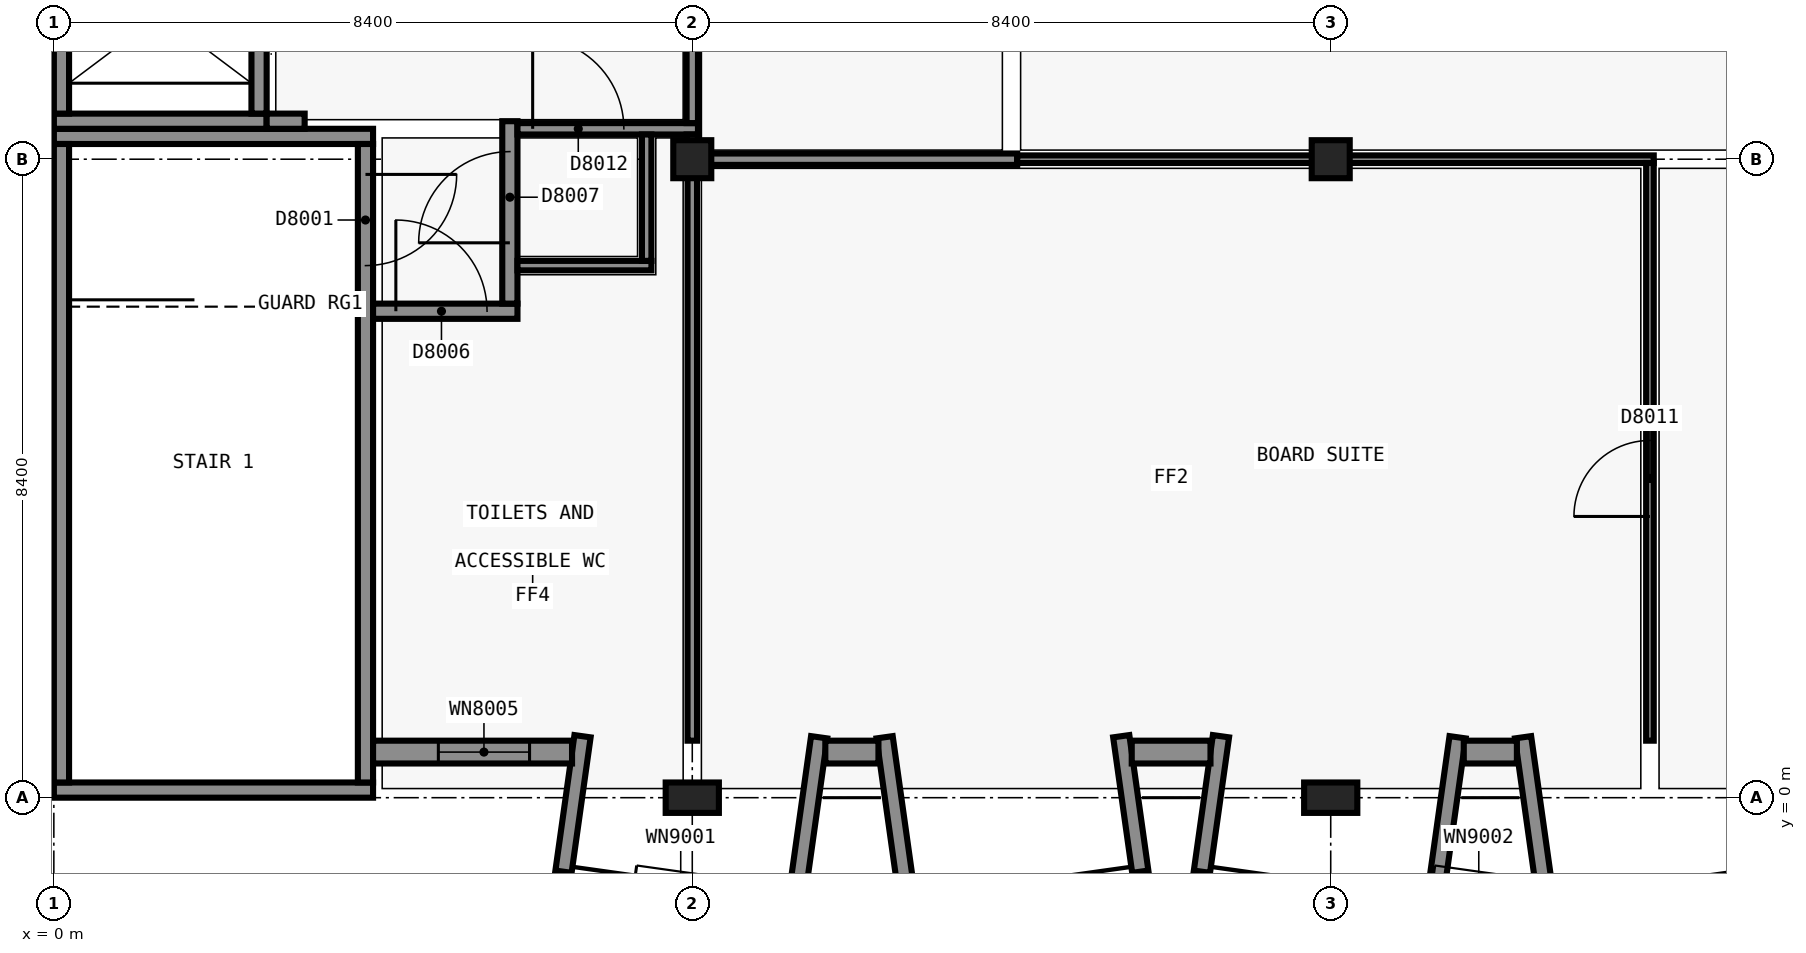
"""IFC4 building model, lengths in metres.
Left out: names, types, materials, properties, quantities, classifications, styles, units other than length and angle.
Written with IfcOpenShell. Run it as: python <this file> out.ifc"""

import sys

from ifc_helpers import new_model, si_unit, direction, frame, frame_2d, origin, origin_2d, place, context, subcontext, project, spatial, rectangle, extrude, element, fill, save


model = new_model("IFC4")
c1 = context("Model", 3, precision=1e-05, world=origin(), true_north=direction((0.0, 1.0)))
c2 = subcontext(c1, "Body", "Model", "MODEL_VIEW")
j1 = project(units=[si_unit("LENGTHUNIT", "METRE"), si_unit("PLANEANGLEUNIT", "RADIAN")], contexts=[c1])
p1 = place(None, origin())
s1 = spatial("IfcSite", under=j1, at=p1, CompositionType="ELEMENT")
p2 = place(p1, origin())
s2 = spatial("IfcBuilding", under=s1, at=p2, CompositionType="ELEMENT")
p3 = place(p2, frame((0.0, 0.0, 38.1)))
s3 = spatial("IfcBuildingStorey", under=s2, at=p3, CompositionType="ELEMENT", Elevation=38.1)
for number, where, z_axis, x_axis in (
    (1, (4.2, 0.1, 0.0), (0.0, 0.0, 1.0), (-1.0, 0.0, 0.0)),
    (2, (0.0, 8.7, 0.0), (0.0, 0.0, 1.0), (1.0, 0.0, 0.0)),
):
    element("IfcWall", number, at=place(p3, frame(where, z_axis=z_axis, x_axis=x_axis)), inside=s3, PredefinedType="SHEAR", context=c2, shape_type="SweptSolid", body=[
        extrude(rectangle(XDim=4.199, YDim=0.2, at=frame_2d((2.1, 0.0))), origin(), (0.0, 0.0, 1.0), 4.5),
    ])
p4 = place(p3, frame((0.1, 0.2, 0.0), z_axis=(0.0, 0.0, 1.0), x_axis=(0.0, 1.0, 0.0)))
e3 = element("IfcWall", 3, at=p4, inside=s3, PredefinedType="SHEAR", context=c2, shape_type="SweptSolid", body=[
    extrude(rectangle(XDim=8.4, YDim=0.2, at=frame_2d((4.2, 0.0))), origin(), (0.0, 0.0, 1.0), 4.5),
])
p5 = place(p3, frame((4.1, 8.6, 0.0), z_axis=(0.0, 0.0, 1.0), x_axis=(0.0, -1.0, 0.0)))
e4 = element("IfcWall", 4, at=p5, inside=s3, PredefinedType="SHEAR", context=c2, shape_type="SweptSolid", body=[
    extrude(rectangle(XDim=8.4, YDim=0.2, at=frame_2d((4.2, 0.0))), origin(), (0.0, 0.0, 1.0), 4.5),
])
p6 = place(p5, frame((0.4, 0.0, 0.0)))
e5 = element("IfcOpeningElement", 5, at=p6, cuts=e4, PredefinedType="OPENING", context=c2, shape_type="SweptSolid", body=[
    extrude(rectangle(XDim=1.2, YDim=2.1, at=frame_2d((0.6, 1.05))), frame((0.0, 0.11, 0.0), z_axis=(0.0, -1.0, 0.0), x_axis=(1.0, 0.0, 0.0)), (0.0, 0.0, 1.0), 0.22),
])
p7 = place(p3, frame((2.8, 8.9, 0.0), z_axis=(0.0, 0.0, 1.0), x_axis=(-1.0, 0.0, 0.0)))
e6 = element("IfcWall", 6, at=p7, inside=s3, PredefinedType="SHEAR", context=c2, shape_type="SweptSolid", body=[
    extrude(rectangle(XDim=2.8, YDim=0.2, at=frame_2d((1.4, 0.0))), origin(), (0.0, 0.0, 1.0), 4.5),
])
p8 = place(p3, frame((0.1, 9.0, 0.0), z_axis=(0.0, 0.0, 1.0), x_axis=(0.0, 1.0, 0.0)))
e7 = element("IfcWall", 7, at=p8, inside=s3, PredefinedType="SHEAR", context=c2, shape_type="SweptSolid", body=[
    extrude(rectangle(XDim=2.7, YDim=0.2, at=frame_2d((1.35, 0.0))), origin(), (0.0, 0.0, 1.0), 4.5),
])
p9 = place(p3, frame((2.7, 11.7, 0.0), z_axis=(0.0, 0.0, 1.0), x_axis=(0.0, -1.0, 0.0)))
e8 = element("IfcWall", 8, at=p9, inside=s3, PredefinedType="SHEAR", context=c2, shape_type="SweptSolid", body=[
    extrude(rectangle(XDim=2.7, YDim=0.2, at=frame_2d((1.35, 0.0))), origin(), (0.0, 0.0, 1.0), 4.5),
])
p10 = place(p9, frame((0.85, 0.0, 0.0)))
e9 = element("IfcOpeningElement", 9, at=p10, cuts=e8, PredefinedType="OPENING", context=c2, shape_type="SweptSolid", body=[
    extrude(rectangle(XDim=1.1, YDim=2.1, at=frame_2d((0.55, 1.05))), frame((0.0, 0.11, 0.0), z_axis=(0.0, -1.0, 0.0), x_axis=(1.0, 0.0, 0.0)), (0.0, 0.0, 1.0), 0.22),
])
p11 = place(p3, frame((8.4, 0.0, 0.0), z_axis=(0.0, 0.0, 1.0), x_axis=(1.0, 0.0, 0.0)))
e10 = element("IfcColumn", 10, at=p11, inside=s3, PredefinedType="COLUMN", context=c2, shape_type="SweptSolid", body=[
    extrude(rectangle(XDim=0.7, YDim=0.4, at=origin_2d()), origin(), (0.0, 0.0, 1.0), 4.5),
])
p12 = place(p3, frame((8.4, 8.4, 0.0), z_axis=(0.0, 0.0, 1.0), x_axis=(1.0, 0.0, 0.0)))
e11 = element("IfcColumn", 11, at=p12, inside=s3, PredefinedType="COLUMN", context=c2, shape_type="SweptSolid", body=[
    extrude(rectangle(XDim=0.5, YDim=0.5, at=origin_2d()), origin(), (0.0, 0.0, 1.0), 4.5),
])
p13 = place(p3, frame((16.8, 0.0, 0.0), z_axis=(0.0, 0.0, 1.0), x_axis=(1.0, 0.0, 0.0)))
e12 = element("IfcColumn", 12, at=p13, inside=s3, PredefinedType="COLUMN", context=c2, shape_type="SweptSolid", body=[
    extrude(rectangle(XDim=0.7, YDim=0.4, at=origin_2d()), origin(), (0.0, 0.0, 1.0), 4.5),
])
p14 = place(p3, frame((16.8, 8.4, 0.0), z_axis=(0.0, 0.0, 1.0), x_axis=(1.0, 0.0, 0.0)))
e13 = element("IfcColumn", 13, at=p14, inside=s3, PredefinedType="COLUMN", context=c2, shape_type="SweptSolid", body=[
    extrude(rectangle(XDim=0.5, YDim=0.5, at=origin_2d()), origin(), (0.0, 0.0, 1.0), 4.5),
])
p15 = place(p3, frame((3.3, 8.9, 0.0), z_axis=(0.0, 0.0, 1.0), x_axis=(-1.0, 0.0, 0.0)))
e14 = element("IfcWall", 14, at=p15, inside=s3, PredefinedType="SHEAR", context=c2, shape_type="SweptSolid", body=[
    extrude(rectangle(XDim=0.5, YDim=0.2, at=frame_2d((0.25, 0.0))), origin(), (0.0, 0.0, 1.0), 4.5),
])
p16 = place(p3, frame((6.956, 0.809, 0.0), z_axis=(0.0, 0.0, 1.0), x_axis=(-0.139161311926, -0.990269725511, 0.0)))
e15 = element("IfcWall", 15, at=p16, inside=s3, PredefinedType="SOLIDWALL", context=c2, shape_type="SweptSolid", body=[
    extrude(rectangle(XDim=1.8, YDim=0.215, at=frame_2d((0.9, 0.0))), origin(), (0.0, 0.0, 1.0), 4.2),
])
for number, where, z_axis, x_axis in (
    (16, (10.069, 0.795, 0.0), (0.0, 0.0, 1.0), (-0.139, -0.99, 0.0)),
    (17, (10.931, 0.795, 0.0), (0.0, 0.0, 1.0), (0.139, -0.99, 0.0)),
):
    element("IfcWall", number, at=place(p3, frame(where, z_axis=z_axis, x_axis=x_axis)), inside=s3, PredefinedType="SOLIDWALL", context=c2, shape_type="SweptSolid", body=[
        extrude(rectangle(XDim=2.219, YDim=0.215, at=frame_2d((1.11, 0.0))), origin(), (0.0, 0.0, 1.0), 4.2),
    ])
for number, where, z_axis, x_axis in (
    (18, (14.044, 0.809, 0.0), (0.0, 0.0, 1.0), (0.139, -0.99, 0.0)),
    (19, (15.356, 0.809, 0.0), (0.0, 0.0, 1.0), (-0.139, -0.99, 0.0)),
):
    element("IfcWall", number, at=place(p3, frame(where, z_axis=z_axis, x_axis=x_axis)), inside=s3, PredefinedType="SOLIDWALL", context=c2, shape_type="SweptSolid", body=[
        extrude(rectangle(XDim=1.8, YDim=0.215, at=frame_2d((0.9, 0.0))), origin(), (0.0, 0.0, 1.0), 4.2),
    ])
p17 = place(p3, frame((18.469, 0.795, 0.0), z_axis=(0.0, 0.0, 1.0), x_axis=(-0.139249775508, -0.99025728981, 0.0)))
e20 = element("IfcWall", 20, at=p17, inside=s3, PredefinedType="SOLIDWALL", context=c2, shape_type="SweptSolid", body=[
    extrude(rectangle(XDim=2.22, YDim=0.215, at=frame_2d((1.11, 0.0))), origin(), (0.0, 0.0, 1.0), 4.2),
])
p18 = place(p3, frame((19.331, 0.795, 0.0), z_axis=(0.0, 0.0, 1.0), x_axis=(0.139141913905, -0.990272451295, 0.0)))
e21 = element("IfcWall", 21, at=p18, inside=s3, PredefinedType="SOLIDWALL", context=c2, shape_type="SweptSolid", body=[
    extrude(rectangle(XDim=2.219, YDim=0.215, at=frame_2d((1.11, 0.0))), origin(), (0.0, 0.0, 1.0), 4.2),
])
p19 = place(p3, frame((6.818, 0.6, 0.0), z_axis=(0.0, 0.0, 1.0), x_axis=(-1.0, 0.0, 0.0)))
e22 = element("IfcWall", 22, at=p19, inside=s3, PredefinedType="SOLIDWALL", context=c2, shape_type="SweptSolid", body=[
    extrude(rectangle(XDim=2.618, YDim=0.3, at=frame_2d((1.309, 0.0))), origin(), (0.0, 0.0, 1.0), 4.2),
])
p20 = place(p19, frame((0.559, 0.0, 0.9)))
e23 = element("IfcOpeningElement", 23, at=p20, cuts=e22, PredefinedType="OPENING", context=c2, shape_type="SweptSolid", body=[
    extrude(rectangle(XDim=1.2, YDim=1.5, at=frame_2d((0.6, 0.75))), frame((0.0, 0.16, 0.0), z_axis=(0.0, -1.0, 0.0), x_axis=(1.0, 0.0, 0.0)), (0.0, 0.0, 1.0), 0.32),
])
p21 = place(p3, frame((10.85, 0.6, 0.0), z_axis=(0.0, 0.0, 1.0), x_axis=(-1.0, 0.0, 0.0)))
e24 = element("IfcWall", 24, at=p21, inside=s3, PredefinedType="SOLIDWALL", context=c2, shape_type="SweptSolid", body=[
    extrude(rectangle(XDim=0.699, YDim=0.3, at=frame_2d((0.35, 0.0))), origin(), (0.0, 0.0, 1.0), 4.2),
])
p22 = place(p3, frame((15.218, 0.6, 0.0), z_axis=(0.0, 0.0, 1.0), x_axis=(-1.0, 0.0, 0.0)))
e25 = element("IfcWall", 25, at=p22, inside=s3, PredefinedType="SOLIDWALL", context=c2, shape_type="SweptSolid", body=[
    extrude(rectangle(XDim=1.036, YDim=0.3, at=frame_2d((0.518, 0.0))), origin(), (0.0, 0.0, 1.0), 4.2),
])
p23 = place(p3, frame((19.25, 0.6, 0.0), z_axis=(0.0, 0.0, 1.0), x_axis=(-1.0, 0.0, 0.0)))
e26 = element("IfcWall", 26, at=p23, inside=s3, PredefinedType="SOLIDWALL", context=c2, shape_type="SweptSolid", body=[
    extrude(rectangle(XDim=0.699, YDim=0.3, at=frame_2d((0.35, 0.0))), origin(), (0.0, 0.0, 1.0), 4.2),
])
p24 = place(p3, frame((4.2, 6.4, 0.0), z_axis=(0.0, 0.0, 1.0), x_axis=(1.0, 0.0, 0.0)))
e27 = element("IfcWall", 27, at=p24, inside=s3, PredefinedType="SOLIDWALL", context=c2, shape_type="SweptSolid", body=[
    extrude(rectangle(XDim=1.9, YDim=0.2, at=frame_2d((0.95, 0.0))), origin(), (0.0, 0.0, 1.0), 4.2),
])
p25 = place(p24, frame((0.3, 0.0, 0.0)))
e28 = element("IfcOpeningElement", 28, at=p25, cuts=e27, PredefinedType="OPENING", context=c2, shape_type="SweptSolid", body=[
    extrude(rectangle(XDim=1.2, YDim=2.1, at=frame_2d((0.6, 1.05))), frame((0.0, 0.11, 0.0), z_axis=(0.0, -1.0, 0.0), x_axis=(1.0, 0.0, 0.0)), (0.0, 0.0, 1.0), 0.22),
])
p26 = place(p3, frame((6.0, 6.5, 0.0), z_axis=(0.0, 0.0, 1.0), x_axis=(0.0, 1.0, 0.0)))
e29 = element("IfcWall", 29, at=p26, inside=s3, PredefinedType="SOLIDWALL", context=c2, shape_type="SweptSolid", body=[
    extrude(rectangle(XDim=2.4, YDim=0.2, at=frame_2d((1.2, 0.0))), origin(), (0.0, 0.0, 1.0), 3.6),
])
p27 = place(p26, frame((0.8, 0.0, 0.0)))
e30 = element("IfcOpeningElement", 30, at=p27, cuts=e29, PredefinedType="OPENING", context=c2, shape_type="SweptSolid", body=[
    extrude(rectangle(XDim=1.2, YDim=2.1, at=frame_2d((0.6, 1.05))), frame((0.0, 0.11, 0.0), z_axis=(0.0, -1.0, 0.0), x_axis=(1.0, 0.0, 0.0)), (0.0, 0.0, 1.0), 0.22),
])
p28 = place(p3, frame((8.325, 8.4, 0.0), z_axis=(0.0, 0.0, 1.0), x_axis=(1.0, 0.0, 0.0)))
e31 = element("IfcWall", 31, at=p28, inside=s3, PredefinedType="PARTITIONING", context=c2, shape_type="SweptSolid", body=[
    extrude(rectangle(XDim=4.35, YDim=0.15, at=frame_2d((2.175, 0.0))), origin(), (0.0, 0.0, 1.0), 3.4),
])
p29 = place(p3, frame((6.1, 8.8, 0.0), z_axis=(0.0, 0.0, 1.0), x_axis=(1.0, 0.0, 0.0)))
e32 = element("IfcWall", 32, at=p29, inside=s3, PredefinedType="SOLIDWALL", context=c2, shape_type="SweptSolid", body=[
    extrude(rectangle(XDim=2.375, YDim=0.15, at=frame_2d((1.188, 0.0))), origin(), (0.0, 0.0, 1.0), 3.4),
])
p30 = place(p29, frame((0.2, 0.0, 0.0)))
e33 = element("IfcOpeningElement", 33, at=p30, cuts=e32, PredefinedType="OPENING", context=c2, shape_type="SweptSolid", body=[
    extrude(rectangle(XDim=1.2, YDim=2.1, at=frame_2d((0.6, 1.05))), frame((0.0, 0.085, 0.0), z_axis=(0.0, -1.0, 0.0), x_axis=(1.0, 0.0, 0.0)), (0.0, 0.0, 1.0), 0.17),
])
p31 = place(p3, frame((8.4, 8.475, 0.0), z_axis=(0.0, 0.0, 1.0), x_axis=(0.0, 1.0, 0.0)))
e34 = element("IfcWall", 34, at=p31, inside=s3, PredefinedType="PARTITIONING", context=c2, shape_type="SweptSolid", body=[
    extrude(rectangle(XDim=0.25, YDim=0.15, at=frame_2d((0.125, 0.0))), origin(), (0.0, 0.0, 1.0), 3.4),
])
p32 = place(p3, frame((8.4, 8.875, 0.0), z_axis=(0.0, 0.0, 1.0), x_axis=(0.0, 1.0, 0.0)))
e35 = element("IfcWall", 35, at=p32, inside=s3, PredefinedType="SOLIDWALL", context=c2, shape_type="SweptSolid", body=[
    extrude(rectangle(XDim=2.85, YDim=0.15, at=frame_2d((1.425, 0.0))), origin(), (0.0, 0.0, 1.0), 3.4),
])
p33 = place(p3, frame((6.1, 7.0, 0.0), z_axis=(0.0, 0.0, 1.0), x_axis=(1.0, 0.0, 0.0)))
e36 = element("IfcWall", 36, at=p33, inside=s3, PredefinedType="PARTITIONING", context=c2, shape_type="SweptSolid", body=[
    extrude(rectangle(XDim=1.762, YDim=0.125, at=frame_2d((0.881, 0.0))), origin(), (0.0, 0.0, 1.0), 4.2),
])
p34 = place(p3, frame((7.8, 7.062, 0.0), z_axis=(0.0, 0.0, 1.0), x_axis=(0.0, 1.0, 0.0)))
e37 = element("IfcWall", 37, at=p34, inside=s3, PredefinedType="PARTITIONING", context=c2, shape_type="SweptSolid", body=[
    extrude(rectangle(XDim=1.663, YDim=0.125, at=frame_2d((0.831, 0.0))), origin(), (0.0, 0.0, 1.0), 3.6),
])
p35 = place(p3, frame((8.4, 0.75, 0.0), z_axis=(0.0, 0.0, 1.0), x_axis=(0.0, 1.0, 0.0)))
e38 = element("IfcWall", 38, at=p35, inside=s3, PredefinedType="PARTITIONING", context=c2, shape_type="SweptSolid", body=[
    extrude(rectangle(XDim=7.575, YDim=0.125, at=frame_2d((3.788, 0.0))), origin(), (0.0, 0.0, 1.0), 3.4),
])
p36 = place(p3, frame((12.675, 8.4, 0.0), z_axis=(0.0, 0.0, 1.0), x_axis=(1.0, 0.0, 0.0)))
e39 = element("IfcWall", 39, at=p36, inside=s3, PredefinedType="PARTITIONING", context=c2, shape_type="SweptSolid", body=[
    extrude(rectangle(XDim=8.375, YDim=0.1, at=frame_2d((4.188, 0.0))), origin(), (0.0, 0.0, 1.0), 3.4),
])
p37 = place(p3, frame((21.0, 0.75, 0.0), z_axis=(0.0, 0.0, 1.0), x_axis=(0.0, 1.0, 0.0)))
e40 = element("IfcWall", 40, at=p37, inside=s3, PredefinedType="PARTITIONING", context=c2, shape_type="SweptSolid", body=[
    extrude(rectangle(XDim=7.6, YDim=0.1, at=frame_2d((3.8, 0.0))), origin(), (0.0, 0.0, 1.0), 3.4),
])
p38 = place(p37, frame((2.95, 0.0, 0.0)))
e41 = element("IfcOpeningElement", 41, at=p38, cuts=e40, PredefinedType="OPENING", context=c2, shape_type="SweptSolid", body=[
    extrude(rectangle(XDim=1.0, YDim=2.1, at=frame_2d((0.5, 1.05))), frame((0.0, 0.06, 0.0), z_axis=(0.0, -1.0, 0.0), x_axis=(1.0, 0.0, 0.0)), (0.0, 0.0, 1.0), 0.12),
])
p39 = place(p20, origin())
e42 = element("IfcWindow", 42, at=p39, inside=s3, PartitioningType="SINGLE_PANEL", PredefinedType="WINDOW", context=c2, shape_type="SweptSolid", body=[
    extrude(rectangle(XDim=1.2, YDim=1.5, at=frame_2d((0.6, 0.75))), frame((0.0, 0.03, 0.0), z_axis=(0.0, -1.0, 0.0), x_axis=(1.0, 0.0, 0.0)), (0.0, 0.0, 1.0), 0.06),
])
fill(e23, e42)
p40 = place(p2, frame((0.0, 0.0, 42.6)))
p41 = place(p40, frame((6.827, -0.882, 0.0), z_axis=(0.0, 0.0, 1.0), x_axis=(0.990268489117, -0.139170109801, 0.0)))
p42 = place(p41, frame((0.835, 0.0, 0.6)))
p43 = place(p42, origin())
e43 = element("IfcWindow", 43, at=p43, inside=s3, PartitioningType="SINGLE_PANEL", PredefinedType="WINDOW", context=c2, shape_type="SweptSolid", body=[
    extrude(rectangle(XDim=1.2, YDim=1.8, at=frame_2d((0.6, 0.9))), frame((0.0, 0.03, 0.0), z_axis=(0.0, -1.0, 0.0), x_axis=(1.0, 0.0, 0.0)), (0.0, 0.0, 1.0), 0.06),
])
p44 = place(p40, frame((15.247, -0.59, 0.0), z_axis=(0.0, 0.0, 1.0), x_axis=(0.990269446541, -0.139163297052, 0.0)))
p45 = place(p44, frame((2.935, 0.0, 0.6)))
p46 = place(p45, origin())
e44 = element("IfcWindow", 44, at=p46, inside=s3, PartitioningType="SINGLE_PANEL", PredefinedType="WINDOW", context=c2, shape_type="SweptSolid", body=[
    extrude(rectangle(XDim=1.2, YDim=1.8, at=frame_2d((0.6, 0.9))), frame((0.0, 0.03, 0.0), z_axis=(0.0, -1.0, 0.0), x_axis=(1.0, 0.0, 0.0)), (0.0, 0.0, 1.0), 0.06),
])
p47 = place(p10, origin())
e45 = element("IfcDoor", 45, at=p47, inside=s3, OperationType="SLIDING_TO_LEFT", PredefinedType="DOOR", context=c2, shape_type="SweptSolid", body=[
    extrude(rectangle(XDim=1.1, YDim=2.1, at=frame_2d((0.55, 1.05))), frame((0.0, 0.025, 0.0), z_axis=(0.0, -1.0, 0.0), x_axis=(1.0, 0.0, 0.0)), (0.0, 0.0, 1.0), 0.05),
])
fill(e9, e45)
p48 = place(p6, origin())
e46 = element("IfcDoor", 46, at=p48, inside=s3, OperationType="SINGLE_SWING_RIGHT", PredefinedType="DOOR", context=c2, shape_type="SweptSolid", body=[
    extrude(rectangle(XDim=1.2, YDim=2.1, at=frame_2d((0.6, 1.05))), frame((0.0, 0.025, 0.0), z_axis=(0.0, -1.0, 0.0), x_axis=(1.0, 0.0, 0.0)), (0.0, 0.0, 1.0), 0.05),
])
fill(e5, e46)
p49 = place(p25, origin())
e47 = element("IfcDoor", 47, at=p49, inside=s3, OperationType="SINGLE_SWING_LEFT", PredefinedType="DOOR", context=c2, shape_type="SweptSolid", body=[
    extrude(rectangle(XDim=1.2, YDim=2.1, at=frame_2d((0.6, 1.05))), frame((0.0, 0.025, 0.0), z_axis=(0.0, -1.0, 0.0), x_axis=(1.0, 0.0, 0.0)), (0.0, 0.0, 1.0), 0.05),
])
fill(e28, e47)
p50 = place(p27, origin())
e48 = element("IfcDoor", 48, at=p50, inside=s3, OperationType="SINGLE_SWING_RIGHT", PredefinedType="DOOR", context=c2, shape_type="SweptSolid", body=[
    extrude(rectangle(XDim=1.2, YDim=2.1, at=frame_2d((0.6, 1.05))), frame((0.0, 0.025, 0.0), z_axis=(0.0, -1.0, 0.0), x_axis=(1.0, 0.0, 0.0)), (0.0, 0.0, 1.0), 0.05),
])
fill(e30, e48)
p51 = place(p38, origin())
e49 = element("IfcDoor", 49, at=p51, inside=s3, OperationType="SINGLE_SWING_RIGHT", PredefinedType="DOOR", context=c2, shape_type="SweptSolid", body=[
    extrude(rectangle(XDim=1.0, YDim=2.1, at=frame_2d((0.5, 1.05))), frame((0.0, 0.025, 0.0), z_axis=(0.0, -1.0, 0.0), x_axis=(1.0, 0.0, 0.0)), (0.0, 0.0, 1.0), 0.05),
])
fill(e41, e49)
p52 = place(p30, origin())
e50 = element("IfcDoor", 50, at=p52, inside=s3, OperationType="SINGLE_SWING_RIGHT", PredefinedType="DOOR", context=c2, shape_type="SweptSolid", body=[
    extrude(rectangle(XDim=1.2, YDim=2.1, at=frame_2d((0.6, 1.05))), frame((0.0, 0.025, 0.0), z_axis=(0.0, -1.0, 0.0), x_axis=(1.0, 0.0, 0.0)), (0.0, 0.0, 1.0), 0.05),
])
fill(e33, e50)
save(model, sys.argv[1])
